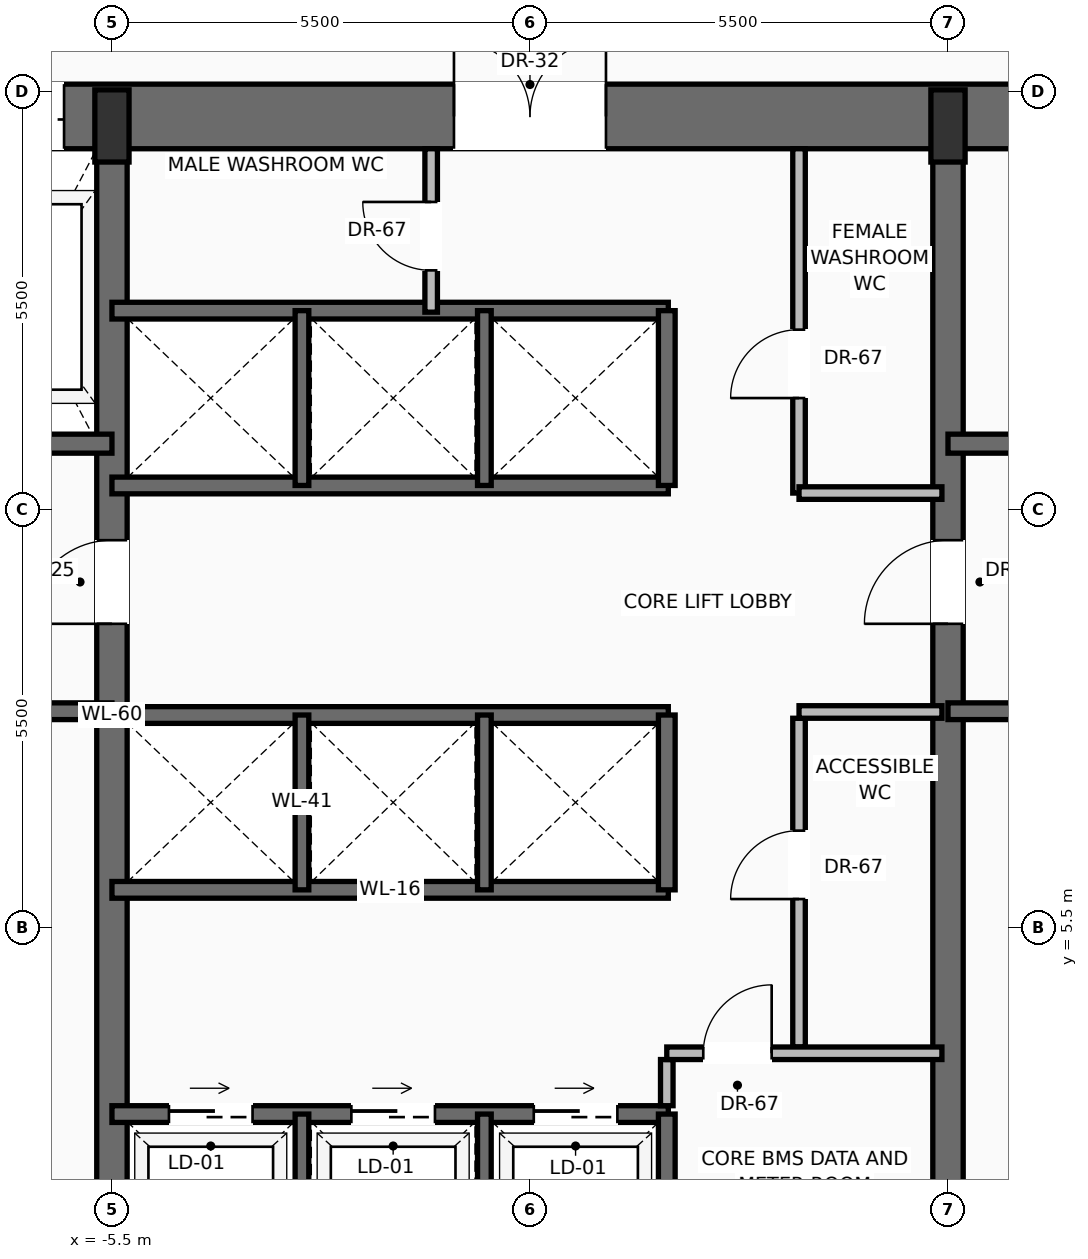
"""IFC4 building model, lengths in metres.
Left out: names, types, materials, properties, quantities, classifications, styles, units other than length and angle.
Written with IfcOpenShell. Run it as: python <this file> out.ifc"""

import sys

from ifc_helpers import new_model, si_unit, direction, frame, frame_2d, origin, origin_2d, place, context, subcontext, project, spatial, rectangle, extrude, source, transform, mapped, element, fill, save


model = new_model("IFC4")
c1 = context("Model", 3, precision=1e-05, world=origin(), true_north=direction((0.0, 1.0)))
c2 = subcontext(c1, "Body", "Model", "MODEL_VIEW")
j1 = project(units=[si_unit("LENGTHUNIT", "METRE"), si_unit("PLANEANGLEUNIT", "RADIAN")], contexts=[c1])
p1 = place(None, origin())
s1 = spatial("IfcSite", under=j1, at=p1, CompositionType="ELEMENT")
p2 = place(p1, origin())
s2 = spatial("IfcBuilding", under=s1, at=p2, CompositionType="ELEMENT")
p3 = place(p2, frame((0.0, 0.0, 57.1)))
s3 = spatial("IfcBuildingStorey", under=s2, at=p3, CompositionType="ELEMENT", Elevation=57.1)
p4 = place(p3, frame((-11.0, 16.175, 0.0), z_axis=(0.0, 0.0, 1.0), x_axis=(1.0, 0.0, 0.0)))
e1 = element("IfcWall", 1, at=p4, inside=s3, PredefinedType="SHEAR", context=c2, shape_type="SweptSolid", body=[
    extrude(rectangle(XDim=22.0, YDim=0.85, at=frame_2d((11.0, 0.0))), origin(), (0.0, 0.0, 1.0), 3.45),
])
p5 = place(p4, frame((3.57, 0.0, 0.0)))
e2 = element("IfcOpeningElement", 2, at=p5, cuts=e1, PredefinedType="OPENING", context=c2, shape_type="SweptSolid", body=[
    extrude(rectangle(XDim=1.3, YDim=2.3, at=frame_2d((0.65, 1.15))), frame((0.0, 0.435, 0.0), z_axis=(0.0, -1.0, 0.0), x_axis=(1.0, 0.0, 0.0)), (0.0, 0.0, 1.0), 0.87),
])
p6 = place(p4, frame((10.0, 0.0, 0.0)))
e3 = element("IfcOpeningElement", 3, at=p6, cuts=e1, PredefinedType="OPENING", context=c2, shape_type="SweptSolid", body=[
    extrude(rectangle(XDim=2.0, YDim=2.4, at=frame_2d((1.0, 1.2))), frame((0.0, 0.435, 0.0), z_axis=(0.0, -1.0, 0.0), x_axis=(1.0, 0.0, 0.0)), (0.0, 0.0, 1.0), 0.87),
])
p7 = place(p3, frame((-5.5, 0.425, 0.0), z_axis=(0.0, 0.0, 1.0), x_axis=(0.0, 1.0, 0.0)))
e4 = element("IfcWall", 4, at=p7, inside=s3, PredefinedType="SHEAR", context=c2, shape_type="SweptSolid", body=[
    extrude(rectangle(XDim=15.75, YDim=0.4, at=frame_2d((7.875, 0.0))), origin(), (0.0, 0.0, 1.0), 3.45),
])
p8 = place(p7, frame((9.075, 0.0, 0.0)))
e5 = element("IfcOpeningElement", 5, at=p8, cuts=e4, PredefinedType="OPENING", context=c2, shape_type="SweptSolid", body=[
    extrude(rectangle(XDim=1.1, YDim=2.2, at=frame_2d((0.55, 1.1))), frame((0.0, 0.21, 0.0), z_axis=(0.0, -1.0, 0.0), x_axis=(1.0, 0.0, 0.0)), (0.0, 0.0, 1.0), 0.42),
])
p9 = place(p3, frame((5.5, 0.425, 0.0), z_axis=(0.0, 0.0, 1.0), x_axis=(0.0, 1.0, 0.0)))
e6 = element("IfcWall", 6, at=p9, inside=s3, PredefinedType="SHEAR", context=c2, shape_type="SweptSolid", body=[
    extrude(rectangle(XDim=15.75, YDim=0.4, at=frame_2d((7.875, 0.0))), origin(), (0.0, 0.0, 1.0), 3.45),
])
p10 = place(p9, frame((9.075, 0.0, 0.0)))
e7 = element("IfcOpeningElement", 7, at=p10, cuts=e6, PredefinedType="OPENING", context=c2, shape_type="SweptSolid", body=[
    extrude(rectangle(XDim=1.1, YDim=2.2, at=frame_2d((0.55, 1.1))), frame((0.0, 0.21, 0.0), z_axis=(0.0, -1.0, 0.0), x_axis=(1.0, 0.0, 0.0)), (0.0, 0.0, 1.0), 0.42),
])
m1 = source(origin(), c2, "Body", "SweptSolid", [
    extrude(rectangle(XDim=0.45, YDim=0.95, at=origin_2d()), origin(), (0.0, 0.0, 1.0), 3.7),
])
for number, where, z_axis, x_axis in (
    (8, (-5.5, 16.05, 0.0), (0.0, 0.0, 1.0), (1.0, 0.0, 0.0)),
    (9, (5.5, 16.05, 0.0), (0.0, 0.0, 1.0), (1.0, 0.0, 0.0)),
):
    element("IfcColumn", number, at=place(p3, frame(where, z_axis=z_axis, x_axis=x_axis)), inside=s3, PredefinedType="PILASTER", context=c2, shape_type="MappedRepresentation", body=[
        mapped(m1, transform((0.0, 0.0, 0.0), scale=1.0)),
    ])
p11 = place(p3, frame((-5.5, 8.35, 0.0), z_axis=(0.0, 0.0, 1.0), x_axis=(-1.0, 0.0, 0.0)))
e10 = element("IfcWall", 10, at=p11, inside=s3, PredefinedType="SOLIDWALL", context=c2, shape_type="SweptSolid", body=[
    extrude(rectangle(XDim=4.65, YDim=0.22, at=frame_2d((2.325, 0.0))), origin(), (0.0, 0.0, 1.0), 3.45),
])
p12 = place(p11, frame((2.5, 0.0, 0.0)))
e11 = element("IfcOpeningElement", 11, at=p12, cuts=e10, PredefinedType="OPENING", context=c2, shape_type="SweptSolid", body=[
    extrude(rectangle(XDim=1.15, YDim=2.2, at=frame_2d((0.575, 1.1))), frame((0.0, 0.12, 0.0), z_axis=(0.0, -1.0, 0.0), x_axis=(1.0, 0.0, 0.0)), (0.0, 0.0, 1.0), 0.24),
])
p13 = place(p3, frame((-5.5, 11.87, 0.0), z_axis=(0.0, 0.0, 1.0), x_axis=(-1.0, 0.0, 0.0)))
e12 = element("IfcWall", 12, at=p13, inside=s3, PredefinedType="SOLIDWALL", context=c2, shape_type="SweptSolid", body=[
    extrude(rectangle(XDim=4.65, YDim=0.25, at=frame_2d((2.325, 0.0))), origin(), (0.0, 0.0, 1.0), 3.45),
])
p14 = place(p13, frame((2.95, 0.0, 0.0)))
e13 = element("IfcOpeningElement", 13, at=p14, cuts=e12, PredefinedType="OPENING", context=c2, shape_type="SweptSolid", body=[
    extrude(rectangle(XDim=1.2, YDim=2.25, at=frame_2d((0.6, 1.125))), frame((0.0, 0.135, 0.0), z_axis=(0.0, -1.0, 0.0), x_axis=(1.0, 0.0, 0.0)), (0.0, 0.0, 1.0), 0.27),
])
p15 = place(p3, frame((10.15, 8.35, 0.0), z_axis=(0.0, 0.0, 1.0), x_axis=(-1.0, 0.0, 0.0)))
e14 = element("IfcWall", 14, at=p15, inside=s3, PredefinedType="SOLIDWALL", context=c2, shape_type="SweptSolid", body=[
    extrude(rectangle(XDim=4.65, YDim=0.22, at=frame_2d((2.325, 0.0))), origin(), (0.0, 0.0, 1.0), 3.45),
])
p16 = place(p15, frame((1.0, 0.0, 0.0)))
e15 = element("IfcOpeningElement", 15, at=p16, cuts=e14, PredefinedType="OPENING", context=c2, shape_type="SweptSolid", body=[
    extrude(rectangle(XDim=1.15, YDim=2.2, at=frame_2d((0.575, 1.1))), frame((0.0, 0.12, 0.0), z_axis=(0.0, -1.0, 0.0), x_axis=(1.0, 0.0, 0.0)), (0.0, 0.0, 1.0), 0.24),
])
p17 = place(p3, frame((10.15, 11.87, 0.0), z_axis=(0.0, 0.0, 1.0), x_axis=(-1.0, 0.0, 0.0)))
e16 = element("IfcWall", 16, at=p17, inside=s3, PredefinedType="SOLIDWALL", context=c2, shape_type="SweptSolid", body=[
    extrude(rectangle(XDim=4.65, YDim=0.25, at=frame_2d((2.325, 0.0))), origin(), (0.0, 0.0, 1.0), 3.45),
])
p18 = place(p17, frame((0.5, 0.0, 0.0)))
e17 = element("IfcOpeningElement", 17, at=p18, cuts=e16, PredefinedType="OPENING", context=c2, shape_type="SweptSolid", body=[
    extrude(rectangle(XDim=1.2, YDim=2.25, at=frame_2d((0.6, 1.125))), frame((0.0, 0.135, 0.0), z_axis=(0.0, -1.0, 0.0), x_axis=(1.0, 0.0, 0.0)), (0.0, 0.0, 1.0), 0.27),
])
p19 = place(p3, frame((-5.5, 3.05, 0.0), z_axis=(0.0, 0.0, 1.0), x_axis=(1.0, 0.0, 0.0)))
e18 = element("IfcWall", 18, at=p19, inside=s3, PredefinedType="SOLIDWALL", context=c2, shape_type="SweptSolid", body=[
    extrude(rectangle(XDim=7.32, YDim=0.22, at=frame_2d((3.66, 0.0))), origin(), (0.0, 0.0, 1.0), 3.45),
])
p20 = place(p19, frame((0.75, 0.0, 0.0)))
e19 = element("IfcOpeningElement", 19, at=p20, cuts=e18, PredefinedType="OPENING", context=c2, shape_type="SweptSolid", body=[
    extrude(rectangle(XDim=1.1, YDim=2.2, at=frame_2d((0.55, 1.1))), frame((0.0, 0.12, 0.0), z_axis=(0.0, -1.0, 0.0), x_axis=(1.0, 0.0, 0.0)), (0.0, 0.0, 1.0), 0.24),
])
p21 = place(p19, frame((3.15, 0.0, 0.0)))
e20 = element("IfcOpeningElement", 20, at=p21, cuts=e18, PredefinedType="OPENING", context=c2, shape_type="SweptSolid", body=[
    extrude(rectangle(XDim=1.1, YDim=2.2, at=frame_2d((0.55, 1.1))), frame((0.0, 0.12, 0.0), z_axis=(0.0, -1.0, 0.0), x_axis=(1.0, 0.0, 0.0)), (0.0, 0.0, 1.0), 0.24),
])
p22 = place(p19, frame((5.55, 0.0, 0.0)))
e21 = element("IfcOpeningElement", 21, at=p22, cuts=e18, PredefinedType="OPENING", context=c2, shape_type="SweptSolid", body=[
    extrude(rectangle(XDim=1.1, YDim=2.2, at=frame_2d((0.55, 1.1))), frame((0.0, 0.12, 0.0), z_axis=(0.0, -1.0, 0.0), x_axis=(1.0, 0.0, 0.0)), (0.0, 0.0, 1.0), 0.24),
])
p23 = place(p3, frame((1.8, 0.85, 0.0), z_axis=(0.0, 0.0, 1.0), x_axis=(0.0, 1.0, 0.0)))
e22 = element("IfcWall", 22, at=p23, inside=s3, PredefinedType="SOLIDWALL", context=c2, shape_type="SweptSolid", body=[
    extrude(rectangle(XDim=2.2, YDim=0.22, at=frame_2d((1.1, 0.0))), origin(), (0.0, 0.0, 1.0), 3.45),
])
for number, where, z_axis, x_axis in (
    (23, (-3.0, 0.85, 0.0), (0.0, 0.0, 1.0), (0.0, 1.0, 0.0)),
    (24, (-0.6, 0.85, 0.0), (0.0, 0.0, 1.0), (0.0, 1.0, 0.0)),
):
    element("IfcWall", number, at=place(p3, frame(where, z_axis=z_axis, x_axis=x_axis)), inside=s3, PredefinedType="SOLIDWALL", context=c2, shape_type="SweptSolid", body=[
        extrude(rectangle(XDim=2.2, YDim=0.18, at=frame_2d((1.1, 0.0))), origin(), (0.0, 0.0, 1.0), 3.45),
    ])
p24 = place(p3, frame((1.8, 3.16, 0.0), z_axis=(0.0, 0.0, 1.0), x_axis=(0.0, 1.0, 0.0)))
e25 = element("IfcWall", 25, at=p24, inside=s3, PredefinedType="PARTITIONING", context=c2, shape_type="SweptSolid", body=[
    extrude(rectangle(XDim=0.608, YDim=0.165, at=frame_2d((0.304, 0.0))), origin(), (0.0, 0.0, 1.0), 3.442),
])
p25 = place(p3, frame((3.54, 3.933, 0.0), z_axis=(0.0, 0.0, 1.0), x_axis=(0.0, 1.0, 0.0)))
e26 = element("IfcWall", 26, at=p25, inside=s3, PredefinedType="PARTITIONING", context=c2, shape_type="SweptSolid", body=[
    extrude(rectangle(XDim=4.325, YDim=0.165, at=frame_2d((2.163, 0.0))), origin(), (0.0, 0.0, 1.0), 3.442),
])
p26 = place(p25, frame((1.946, 0.0, 0.0)))
e27 = element("IfcOpeningElement", 27, at=p26, cuts=e26, PredefinedType="OPENING", context=c2, shape_type="SweptSolid", body=[
    extrude(rectangle(XDim=0.9, YDim=2.1, at=frame_2d((0.45, 1.05))), frame((0.0, 0.093, 0.0), z_axis=(0.0, -1.0, 0.0), x_axis=(1.0, 0.0, 0.0)), (0.0, 0.0, 1.0), 0.185),
])
p27 = place(p3, frame((3.54, 8.34, 0.0), z_axis=(0.0, 0.0, 1.0), x_axis=(1.0, 0.0, 0.0)))
e28 = element("IfcWall", 28, at=p27, inside=s3, PredefinedType="PARTITIONING", context=c2, shape_type="SweptSolid", body=[
    extrude(rectangle(XDim=1.88, YDim=0.165, at=frame_2d((0.94, 0.0))), origin(), (0.0, 0.0, 1.0), 3.442),
])
p28 = place(p3, frame((1.8, 3.85, 0.0), z_axis=(0.0, 0.0, 1.0), x_axis=(1.0, 0.0, 0.0)))
e29 = element("IfcWall", 29, at=p28, inside=s3, PredefinedType="PARTITIONING", context=c2, shape_type="SweptSolid", body=[
    extrude(rectangle(XDim=3.62, YDim=0.165, at=frame_2d((1.81, 0.0))), origin(), (0.0, 0.0, 1.0), 3.442),
])
p29 = place(p28, frame((0.48, 0.0, 0.0)))
e30 = element("IfcOpeningElement", 30, at=p29, cuts=e29, PredefinedType="OPENING", context=c2, shape_type="SweptSolid", body=[
    extrude(rectangle(XDim=0.9, YDim=2.1, at=frame_2d((0.45, 1.05))), frame((0.0, 0.093, 0.0), z_axis=(0.0, -1.0, 0.0), x_axis=(1.0, 0.0, 0.0)), (0.0, 0.0, 1.0), 0.185),
])
for number, where, z_axis, x_axis in (
    (31, (-5.5, 6.0, 0.0), (0.0, 0.0, 1.0), (1.0, 0.0, 0.0)),
    (32, (-5.5, 8.3, 0.0), (0.0, 0.0, 1.0), (1.0, 0.0, 0.0)),
):
    element("IfcWall", number, at=place(p3, frame(where, z_axis=z_axis, x_axis=x_axis)), inside=s3, PredefinedType="SOLIDWALL", context=c2, shape_type="SweptSolid", body=[
        extrude(rectangle(XDim=7.32, YDim=0.22, at=frame_2d((3.66, 0.0))), origin(), (0.0, 0.0, 1.0), 3.45),
    ])
p30 = place(p3, frame((1.8, 6.0, 0.0), z_axis=(0.0, 0.0, 1.0), x_axis=(0.0, 1.0, 0.0)))
e33 = element("IfcWall", 33, at=p30, inside=s3, PredefinedType="SOLIDWALL", context=c2, shape_type="SweptSolid", body=[
    extrude(rectangle(XDim=2.3, YDim=0.22, at=frame_2d((1.15, 0.0))), origin(), (0.0, 0.0, 1.0), 3.45),
])
for number, where, z_axis, x_axis in (
    (34, (-3.0, 6.0, 0.0), (0.0, 0.0, 1.0), (0.0, 1.0, 0.0)),
    (35, (-0.6, 6.0, 0.0), (0.0, 0.0, 1.0), (0.0, 1.0, 0.0)),
):
    element("IfcWall", number, at=place(p3, frame(where, z_axis=z_axis, x_axis=x_axis)), inside=s3, PredefinedType="SOLIDWALL", context=c2, shape_type="SweptSolid", body=[
        extrude(rectangle(XDim=2.3, YDim=0.18, at=frame_2d((1.15, 0.0))), origin(), (0.0, 0.0, 1.0), 3.45),
    ])
for number, where, z_axis, x_axis in (
    (36, (-5.5, 11.32, 0.0), (0.0, 0.0, 1.0), (1.0, 0.0, 0.0)),
    (37, (-5.5, 13.62, 0.0), (0.0, 0.0, 1.0), (1.0, 0.0, 0.0)),
):
    element("IfcWall", number, at=place(p3, frame(where, z_axis=z_axis, x_axis=x_axis)), inside=s3, PredefinedType="SOLIDWALL", context=c2, shape_type="SweptSolid", body=[
        extrude(rectangle(XDim=7.32, YDim=0.22, at=frame_2d((3.66, 0.0))), origin(), (0.0, 0.0, 1.0), 3.45),
    ])
p31 = place(p3, frame((1.8, 11.32, 0.0), z_axis=(0.0, 0.0, 1.0), x_axis=(0.0, 1.0, 0.0)))
e38 = element("IfcWall", 38, at=p31, inside=s3, PredefinedType="SOLIDWALL", context=c2, shape_type="SweptSolid", body=[
    extrude(rectangle(XDim=2.3, YDim=0.22, at=frame_2d((1.15, 0.0))), origin(), (0.0, 0.0, 1.0), 3.45),
])
for number, where, z_axis, x_axis in (
    (39, (-3.0, 11.32, 0.0), (0.0, 0.0, 1.0), (0.0, 1.0, 0.0)),
    (40, (-0.6, 11.32, 0.0), (0.0, 0.0, 1.0), (0.0, 1.0, 0.0)),
):
    element("IfcWall", number, at=place(p3, frame(where, z_axis=z_axis, x_axis=x_axis)), inside=s3, PredefinedType="SOLIDWALL", context=c2, shape_type="SweptSolid", body=[
        extrude(rectangle(XDim=2.3, YDim=0.18, at=frame_2d((1.15, 0.0))), origin(), (0.0, 0.0, 1.0), 3.45),
    ])
p32 = place(p3, frame((-1.3, 13.6, 0.0), z_axis=(0.0, 0.0, 1.0), x_axis=(0.0, 1.0, 0.0)))
e41 = element("IfcWall", 41, at=p32, inside=s3, PredefinedType="PARTITIONING", context=c2, shape_type="SweptSolid", body=[
    extrude(rectangle(XDim=2.15, YDim=0.165, at=frame_2d((1.075, 0.0))), origin(), (0.0, 0.0, 1.0), 3.442),
])
p33 = place(p32, frame((0.55, 0.0, 0.0)))
e42 = element("IfcOpeningElement", 42, at=p33, cuts=e41, PredefinedType="OPENING", context=c2, shape_type="SweptSolid", body=[
    extrude(rectangle(XDim=0.9, YDim=2.1, at=frame_2d((0.45, 1.05))), frame((0.0, 0.093, 0.0), z_axis=(0.0, -1.0, 0.0), x_axis=(1.0, 0.0, 0.0)), (0.0, 0.0, 1.0), 0.185),
])
p34 = place(p3, frame((3.54, 11.22, 0.0), z_axis=(0.0, 0.0, 1.0), x_axis=(0.0, 1.0, 0.0)))
e43 = element("IfcWall", 43, at=p34, inside=s3, PredefinedType="PARTITIONING", context=c2, shape_type="SweptSolid", body=[
    extrude(rectangle(XDim=4.53, YDim=0.165, at=frame_2d((2.265, 0.0))), origin(), (0.0, 0.0, 1.0), 3.442),
])
p35 = place(p34, frame((1.25, 0.0, 0.0)))
e44 = element("IfcOpeningElement", 44, at=p35, cuts=e43, PredefinedType="OPENING", context=c2, shape_type="SweptSolid", body=[
    extrude(rectangle(XDim=0.9, YDim=2.1, at=frame_2d((0.45, 1.05))), frame((0.0, 0.093, 0.0), z_axis=(0.0, -1.0, 0.0), x_axis=(1.0, 0.0, 0.0)), (0.0, 0.0, 1.0), 0.185),
])
p36 = place(p3, frame((3.54, 11.22, 0.0), z_axis=(0.0, 0.0, 1.0), x_axis=(1.0, 0.0, 0.0)))
e45 = element("IfcWall", 45, at=p36, inside=s3, PredefinedType="PARTITIONING", context=c2, shape_type="SweptSolid", body=[
    extrude(rectangle(XDim=1.88, YDim=0.165, at=frame_2d((0.94, 0.0))), origin(), (0.0, 0.0, 1.0), 3.442),
])
m2 = source(origin(), c2, "Body", "SweptSolid", [
    extrude(rectangle(XDim=1.1, YDim=2.2, at=frame_2d((0.55, 1.1))), frame((0.0, 0.025, 0.0), z_axis=(0.0, -1.0, 0.0), x_axis=(1.0, 0.0, 0.0)), (0.0, 0.0, 1.0), 0.05),
])
p37 = place(p8, origin())
e46 = element("IfcDoor", 46, at=p37, inside=s3, OperationType="SINGLE_SWING_LEFT", PredefinedType="DOOR", context=c2, shape_type="MappedRepresentation", body=[
    mapped(m2, transform((0.0, 0.0, 0.0), scale=1.0)),
])
fill(e5, e46)
m3 = source(origin(), c2, "Body", "SweptSolid", [
    extrude(rectangle(XDim=1.3, YDim=2.3, at=frame_2d((0.65, 1.15))), frame((0.0, 0.025, 0.0), z_axis=(0.0, -1.0, 0.0), x_axis=(1.0, 0.0, 0.0)), (0.0, 0.0, 1.0), 0.05),
])
p38 = place(p5, origin())
e47 = element("IfcDoor", 47, at=p38, inside=s3, OperationType="SLIDING_TO_RIGHT", PredefinedType="DOOR", context=c2, shape_type="MappedRepresentation", body=[
    mapped(m3, transform((0.0, 0.0, 0.0), scale=1.0)),
])
fill(e2, e47)
p39 = place(p10, origin())
e48 = element("IfcDoor", 48, at=p39, inside=s3, OperationType="SINGLE_SWING_LEFT", PredefinedType="DOOR", context=c2, shape_type="MappedRepresentation", body=[
    mapped(m2, transform((0.0, 0.0, 0.0), scale=1.0)),
])
fill(e7, e48)
m4 = source(origin(), c2, "Body", "SweptSolid", [
    extrude(rectangle(XDim=2.0, YDim=2.4, at=frame_2d((1.0, 1.2))), frame((0.0, 0.025, 0.0), z_axis=(0.0, -1.0, 0.0), x_axis=(1.0, 0.0, 0.0)), (0.0, 0.0, 1.0), 0.05),
])
p40 = place(p6, origin())
e49 = element("IfcDoor", 49, at=p40, inside=s3, OperationType="DOUBLE_DOOR_SINGLE_SWING", PredefinedType="DOOR", context=c2, shape_type="MappedRepresentation", body=[
    mapped(m4, transform((0.0, 0.0, 0.0), scale=1.0)),
])
fill(e3, e49)
m5 = source(origin(), c2, "Body", "SweptSolid", [
    extrude(rectangle(XDim=1.1, YDim=2.2, at=frame_2d((0.55, 1.1))), frame((0.0, 0.025, 0.0), z_axis=(0.0, -1.0, 0.0), x_axis=(1.0, 0.0, 0.0)), (0.0, 0.0, 1.0), 0.05),
])
p41 = place(p20, origin())
e50 = element("IfcDoor", 50, at=p41, inside=s3, OperationType="SLIDING_TO_RIGHT", PredefinedType="DOOR", context=c2, shape_type="MappedRepresentation", body=[
    mapped(m5, transform((0.0, 0.0, 0.0), scale=1.0)),
])
fill(e19, e50)
p42 = place(p21, origin())
e51 = element("IfcDoor", 51, at=p42, inside=s3, OperationType="SLIDING_TO_RIGHT", PredefinedType="DOOR", context=c2, shape_type="MappedRepresentation", body=[
    mapped(m5, transform((0.0, 0.0, 0.0), scale=1.0)),
])
fill(e20, e51)
p43 = place(p22, origin())
e52 = element("IfcDoor", 52, at=p43, inside=s3, OperationType="SLIDING_TO_RIGHT", PredefinedType="DOOR", context=c2, shape_type="MappedRepresentation", body=[
    mapped(m5, transform((0.0, 0.0, 0.0), scale=1.0)),
])
fill(e21, e52)
m6 = source(origin(), c2, "Body", "SweptSolid", [
    extrude(rectangle(XDim=0.9, YDim=2.1, at=frame_2d((0.45, 1.05))), frame((0.0, 0.025, 0.0), z_axis=(0.0, -1.0, 0.0), x_axis=(1.0, 0.0, 0.0)), (0.0, 0.0, 1.0), 0.05),
])
p44 = place(p29, origin())
e53 = element("IfcDoor", 53, at=p44, inside=s3, OperationType="SINGLE_SWING_RIGHT", PredefinedType="DOOR", context=c2, shape_type="MappedRepresentation", body=[
    mapped(m6, transform((0.0, 0.0, 0.0), scale=1.0)),
])
fill(e30, e53)
p45 = place(p26, origin())
e54 = element("IfcDoor", 54, at=p45, inside=s3, OperationType="SINGLE_SWING_LEFT", PredefinedType="DOOR", context=c2, shape_type="MappedRepresentation", body=[
    mapped(m6, transform((0.0, 0.0, 0.0), scale=1.0)),
])
fill(e27, e54)
p46 = place(p33, origin())
e55 = element("IfcDoor", 55, at=p46, inside=s3, OperationType="SINGLE_SWING_RIGHT", PredefinedType="DOOR", context=c2, shape_type="MappedRepresentation", body=[
    mapped(m6, transform((0.0, 0.0, 0.0), scale=1.0)),
])
fill(e42, e55)
p47 = place(p35, origin())
e56 = element("IfcDoor", 56, at=p47, inside=s3, OperationType="SINGLE_SWING_LEFT", PredefinedType="DOOR", context=c2, shape_type="MappedRepresentation", body=[
    mapped(m6, transform((0.0, 0.0, 0.0), scale=1.0)),
])
fill(e44, e56)
save(model, sys.argv[1])
